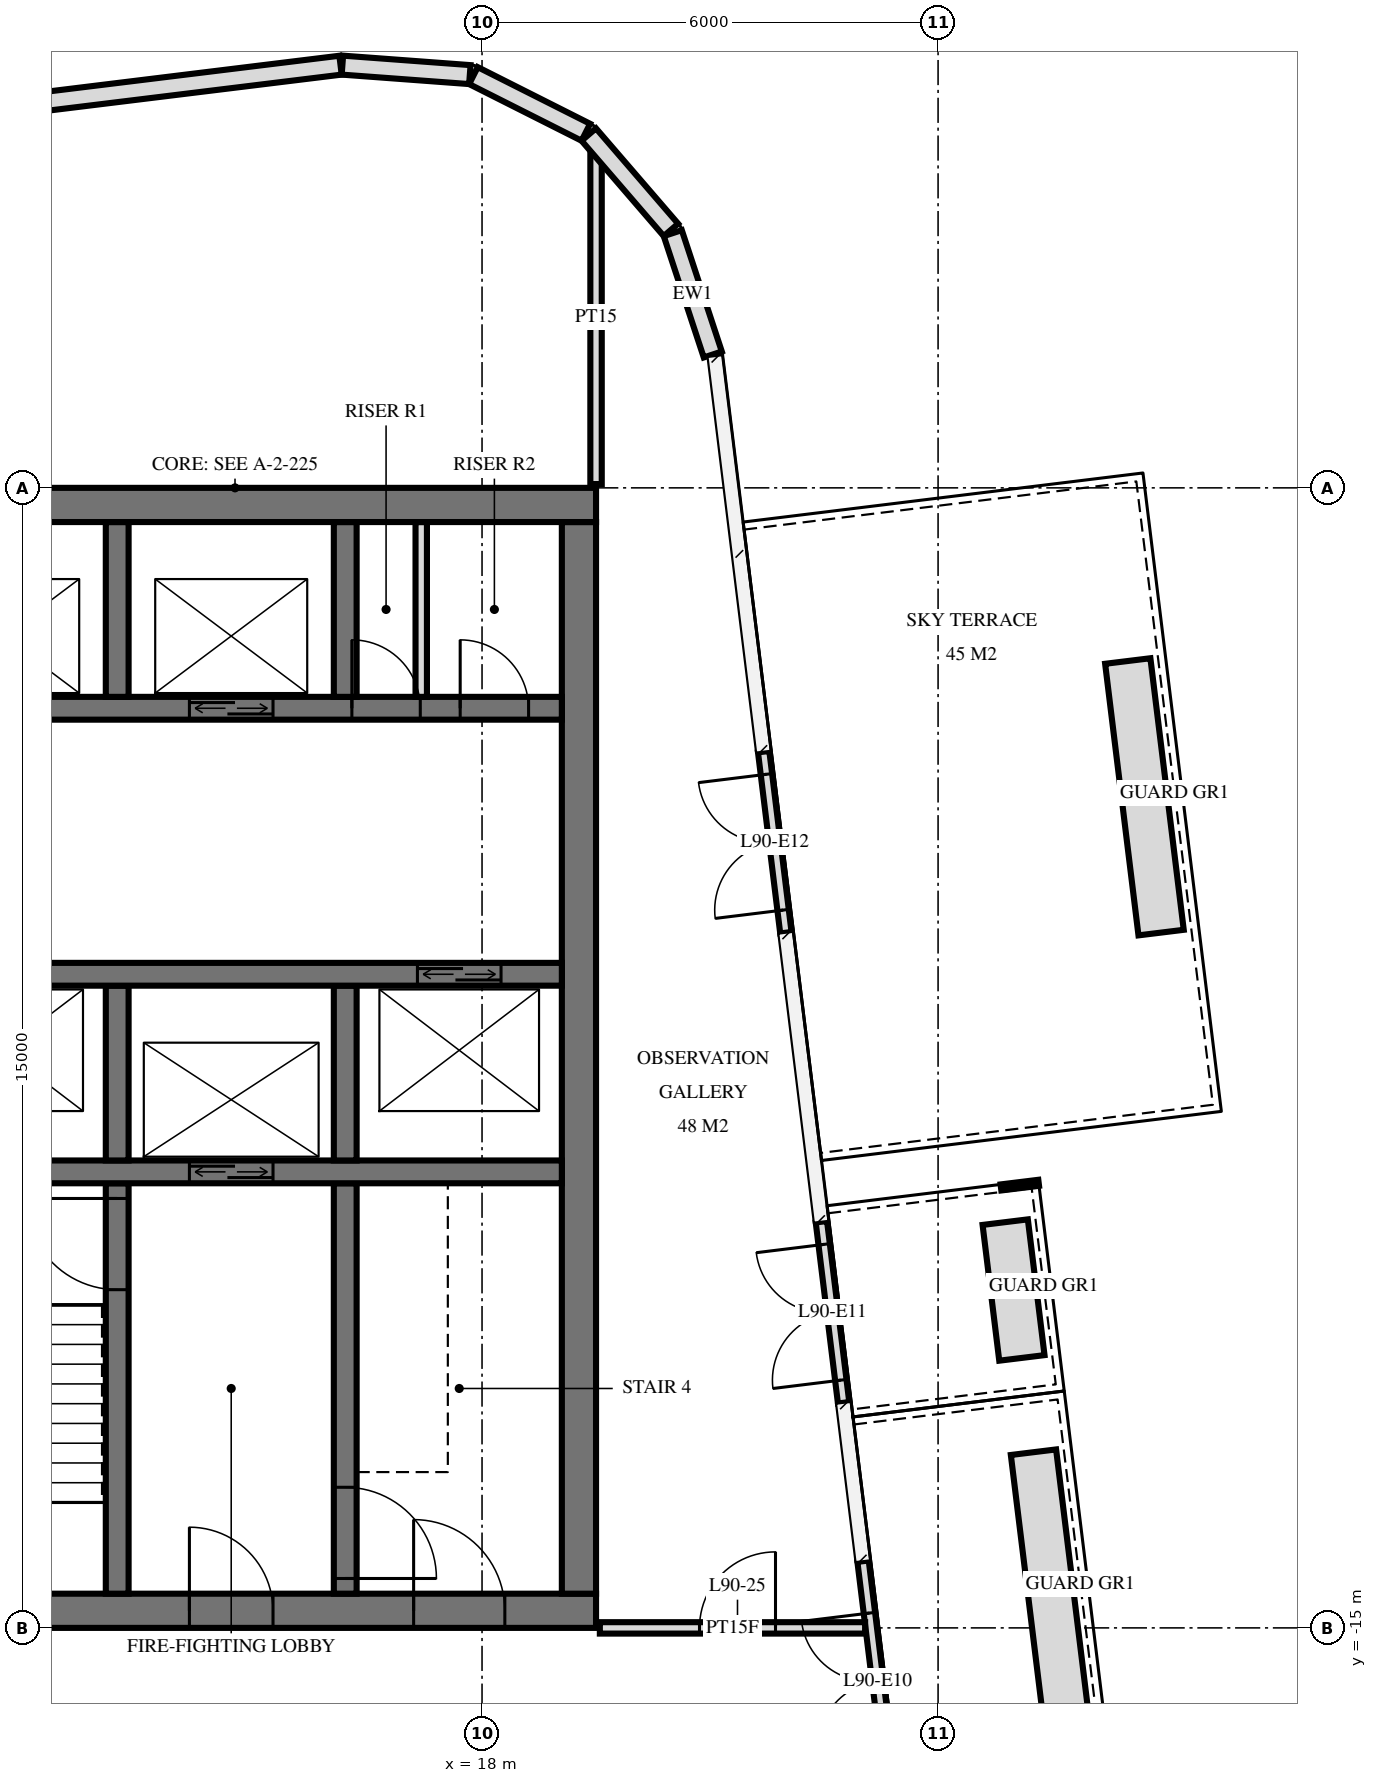
"""IFC4 building model, lengths in metres.
Left out: names, types, materials, properties, quantities, classifications, styles, units other than length and angle.
Written with IfcOpenShell. Run it as: python <this file> out.ifc"""

import sys

from ifc_helpers import new_model, si_unit, direction, frame, frame_2d, origin, place, context, subcontext, project, spatial, rectangle, extrude, element, fill, save


model = new_model("IFC4")
c1 = context("Model", 3, precision=1e-05, world=origin(), true_north=direction((0.0, 1.0)))
c2 = subcontext(c1, "Body", "Model", "MODEL_VIEW")
j1 = project(units=[si_unit("LENGTHUNIT", "METRE"), si_unit("PLANEANGLEUNIT", "RADIAN")], contexts=[c1])
p1 = place(None, origin())
s1 = spatial("IfcSite", under=j1, at=p1, CompositionType="ELEMENT")
p2 = place(p1, origin())
s2 = spatial("IfcBuilding", under=s1, at=p2, CompositionType="ELEMENT")
p3 = place(p2, frame((0.0, 0.0, 342.6)))
s3 = spatial("IfcBuildingStorey", under=s2, at=p3, CompositionType="ELEMENT", Elevation=342.6)
p4 = place(p3, frame((10.0, -0.225, 0.0), z_axis=(0.0, 0.0, 1.0), x_axis=(1.0, 0.0, 0.0)))
e1 = element("IfcWall", 1, at=p4, inside=s3, PredefinedType="SHEAR", context=c2, shape_type="SweptSolid", body=[
    extrude(rectangle(XDim=9.5, YDim=0.45, at=frame_2d((4.75, 0.0))), origin(), (0.0, 0.0, 1.0), 4.0),
])
p5 = place(p3, frame((10.0, -14.775, 0.0), z_axis=(0.0, 0.0, 1.0), x_axis=(1.0, 0.0, 0.0)))
e2 = element("IfcWall", 2, at=p5, inside=s3, PredefinedType="SHEAR", context=c2, shape_type="SweptSolid", body=[
    extrude(rectangle(XDim=9.5, YDim=0.45, at=frame_2d((4.75, 0.0))), origin(), (0.0, 0.0, 1.0), 4.0),
])
p6 = place(p5, frame((7.1, 0.0, 0.0)))
e3 = element("IfcOpeningElement", 3, at=p6, cuts=e2, PredefinedType="OPENING", context=c2, shape_type="SweptSolid", body=[
    extrude(rectangle(XDim=1.2, YDim=2.1, at=frame_2d((0.6, 1.05))), frame((0.0, 0.235, 0.0), z_axis=(0.0, -1.0, 0.0), x_axis=(1.0, 0.0, 0.0)), (0.0, 0.0, 1.0), 0.47),
])
p7 = place(p5, frame((4.15, 0.0, 0.0)))
e4 = element("IfcOpeningElement", 4, at=p7, cuts=e2, PredefinedType="OPENING", context=c2, shape_type="SweptSolid", body=[
    extrude(rectangle(XDim=1.1, YDim=2.1, at=frame_2d((0.55, 1.05))), frame((0.0, 0.235, 0.0), z_axis=(0.0, -1.0, 0.0), x_axis=(1.0, 0.0, 0.0)), (0.0, 0.0, 1.0), 0.47),
])
p8 = place(p3, frame((19.275, -14.55, 0.0), z_axis=(0.0, 0.0, 1.0), x_axis=(0.0, 1.0, 0.0)))
e5 = element("IfcWall", 5, at=p8, inside=s3, PredefinedType="SHEAR", context=c2, shape_type="SweptSolid", body=[
    extrude(rectangle(XDim=14.1, YDim=0.45, at=frame_2d((7.05, 0.0))), origin(), (0.0, 0.0, 1.0), 4.0),
])
p9 = place(p3, frame((10.35, -2.9, 0.0), z_axis=(0.0, 0.0, 1.0), x_axis=(1.0, 0.0, 0.0)))
e6 = element("IfcWall", 6, at=p9, inside=s3, PredefinedType="SHEAR", context=c2, shape_type="SweptSolid", body=[
    extrude(rectangle(XDim=8.7, YDim=0.3, at=frame_2d((4.35, 0.0))), origin(), (0.0, 0.0, 1.0), 4.0),
])
p10 = place(p9, frame((0.8, 0.0, 0.0)))
e7 = element("IfcOpeningElement", 7, at=p10, cuts=e6, PredefinedType="OPENING", context=c2, shape_type="SweptSolid", body=[
    extrude(rectangle(XDim=1.1, YDim=2.1, at=frame_2d((0.55, 1.05))), frame((0.0, 0.16, 0.0), z_axis=(0.0, -1.0, 0.0), x_axis=(1.0, 0.0, 0.0)), (0.0, 0.0, 1.0), 0.32),
])
p11 = place(p9, frame((3.8, 0.0, 0.0)))
e8 = element("IfcOpeningElement", 8, at=p11, cuts=e6, PredefinedType="OPENING", context=c2, shape_type="SweptSolid", body=[
    extrude(rectangle(XDim=1.1, YDim=2.1, at=frame_2d((0.55, 1.05))), frame((0.0, 0.16, 0.0), z_axis=(0.0, -1.0, 0.0), x_axis=(1.0, 0.0, 0.0)), (0.0, 0.0, 1.0), 0.32),
])
p12 = place(p9, frame((5.938, 0.0, 0.0)))
e9 = element("IfcOpeningElement", 9, at=p12, cuts=e6, PredefinedType="OPENING", context=c2, shape_type="SweptSolid", body=[
    extrude(rectangle(XDim=0.9, YDim=2.1, at=frame_2d((0.45, 1.05))), frame((0.0, 0.16, 0.0), z_axis=(0.0, -1.0, 0.0), x_axis=(1.0, 0.0, 0.0)), (0.0, 0.0, 1.0), 0.32),
])
p13 = place(p9, frame((7.363, 0.0, 0.0)))
e10 = element("IfcOpeningElement", 10, at=p13, cuts=e6, PredefinedType="OPENING", context=c2, shape_type="SweptSolid", body=[
    extrude(rectangle(XDim=0.9, YDim=2.1, at=frame_2d((0.45, 1.05))), frame((0.0, 0.16, 0.0), z_axis=(0.0, -1.0, 0.0), x_axis=(1.0, 0.0, 0.0)), (0.0, 0.0, 1.0), 0.32),
])
p14 = place(p3, frame((10.35, -6.4, 0.0), z_axis=(0.0, 0.0, 1.0), x_axis=(1.0, 0.0, 0.0)))
e11 = element("IfcWall", 11, at=p14, inside=s3, PredefinedType="SHEAR", context=c2, shape_type="SweptSolid", body=[
    extrude(rectangle(XDim=8.7, YDim=0.3, at=frame_2d((4.35, 0.0))), origin(), (0.0, 0.0, 1.0), 4.0),
])
p15 = place(p14, frame((0.8, 0.0, 0.0)))
e12 = element("IfcOpeningElement", 12, at=p15, cuts=e11, PredefinedType="OPENING", context=c2, shape_type="SweptSolid", body=[
    extrude(rectangle(XDim=1.1, YDim=2.1, at=frame_2d((0.55, 1.05))), frame((0.0, 0.16, 0.0), z_axis=(0.0, -1.0, 0.0), x_axis=(1.0, 0.0, 0.0)), (0.0, 0.0, 1.0), 0.32),
])
p16 = place(p14, frame((6.8, 0.0, 0.0)))
e13 = element("IfcOpeningElement", 13, at=p16, cuts=e11, PredefinedType="OPENING", context=c2, shape_type="SweptSolid", body=[
    extrude(rectangle(XDim=1.1, YDim=2.1, at=frame_2d((0.55, 1.05))), frame((0.0, 0.16, 0.0), z_axis=(0.0, -1.0, 0.0), x_axis=(1.0, 0.0, 0.0)), (0.0, 0.0, 1.0), 0.32),
])
p17 = place(p3, frame((10.35, -9.0, 0.0), z_axis=(0.0, 0.0, 1.0), x_axis=(1.0, 0.0, 0.0)))
e14 = element("IfcWall", 14, at=p17, inside=s3, PredefinedType="SHEAR", context=c2, shape_type="SweptSolid", body=[
    extrude(rectangle(XDim=8.7, YDim=0.3, at=frame_2d((4.35, 0.0))), origin(), (0.0, 0.0, 1.0), 4.0),
])
p18 = place(p17, frame((3.8, 0.0, 0.0)))
e15 = element("IfcOpeningElement", 15, at=p18, cuts=e14, PredefinedType="OPENING", context=c2, shape_type="SweptSolid", body=[
    extrude(rectangle(XDim=1.1, YDim=2.1, at=frame_2d((0.55, 1.05))), frame((0.0, 0.16, 0.0), z_axis=(0.0, -1.0, 0.0), x_axis=(1.0, 0.0, 0.0)), (0.0, 0.0, 1.0), 0.32),
])
for number, where, z_axis, x_axis in (
    (16, (13.2, -2.75, 0.0), (0.0, 0.0, 1.0), (0.0, 1.0, 0.0)),
    (17, (13.2, -8.85, 0.0), (0.0, 0.0, 1.0), (0.0, 1.0, 0.0)),
):
    element("IfcWall", number, at=place(p3, frame(where, z_axis=z_axis, x_axis=x_axis)), inside=s3, PredefinedType="SHEAR", context=c2, shape_type="SweptSolid", body=[
        extrude(rectangle(XDim=2.3, YDim=0.3, at=frame_2d((1.15, 0.0))), origin(), (0.0, 0.0, 1.0), 4.0),
    ])
p19 = place(p3, frame((13.2, -14.55, 0.0), z_axis=(0.0, 0.0, 1.0), x_axis=(0.0, 1.0, 0.0)))
e18 = element("IfcWall", 18, at=p19, inside=s3, PredefinedType="SHEAR", context=c2, shape_type="SweptSolid", body=[
    extrude(rectangle(XDim=5.4, YDim=0.3, at=frame_2d((2.7, 0.0))), origin(), (0.0, 0.0, 1.0), 4.0),
])
p20 = place(p19, frame((4.0, 0.0, 0.0)))
e19 = element("IfcOpeningElement", 19, at=p20, cuts=e18, PredefinedType="OPENING", context=c2, shape_type="SweptSolid", body=[
    extrude(rectangle(XDim=1.2, YDim=2.1, at=frame_2d((0.6, 1.05))), frame((0.0, 0.16, 0.0), z_axis=(0.0, -1.0, 0.0), x_axis=(1.0, 0.0, 0.0)), (0.0, 0.0, 1.0), 0.32),
])
for number, where, z_axis, x_axis in (
    (20, (16.2, -2.75, 0.0), (0.0, 0.0, 1.0), (0.0, 1.0, 0.0)),
    (21, (16.2, -8.85, 0.0), (0.0, 0.0, 1.0), (0.0, 1.0, 0.0)),
):
    element("IfcWall", number, at=place(p3, frame(where, z_axis=z_axis, x_axis=x_axis)), inside=s3, PredefinedType="SHEAR", context=c2, shape_type="SweptSolid", body=[
        extrude(rectangle(XDim=2.3, YDim=0.3, at=frame_2d((1.15, 0.0))), origin(), (0.0, 0.0, 1.0), 4.0),
    ])
p21 = place(p3, frame((16.2, -14.55, 0.0), z_axis=(0.0, 0.0, 1.0), x_axis=(0.0, 1.0, 0.0)))
e22 = element("IfcWall", 22, at=p21, inside=s3, PredefinedType="SHEAR", context=c2, shape_type="SweptSolid", body=[
    extrude(rectangle(XDim=5.4, YDim=0.3, at=frame_2d((2.7, 0.0))), origin(), (0.0, 0.0, 1.0), 4.0),
])
p22 = place(p21, frame((0.2, 0.0, 0.0)))
e23 = element("IfcOpeningElement", 23, at=p22, cuts=e22, PredefinedType="OPENING", context=c2, shape_type="SweptSolid", body=[
    extrude(rectangle(XDim=1.2, YDim=2.1, at=frame_2d((0.6, 1.05))), frame((0.0, 0.16, 0.0), z_axis=(0.0, -1.0, 0.0), x_axis=(1.0, 0.0, 0.0)), (0.0, 0.0, 1.0), 0.32),
])
p23 = place(p3, frame((21.036, 1.755, 0.0), z_axis=(0.0, 0.0, 1.0), x_axis=(-0.313046160822, 0.949737911844, 0.0)))
e24 = element("IfcWall", 24, at=p23, inside=s3, PredefinedType="SOLIDWALL", context=c2, shape_type="SweptSolid", body=[
    extrude(rectangle(XDim=1.681, YDim=0.25, at=frame_2d((0.841, 0.0))), origin(), (0.0, 0.0, 1.0), 3.72),
])
for number, where, z_axis, x_axis in (
    (25, (20.485, 3.394, 0.0), (0.0, 0.0, 1.0), (-0.653, 0.758, 0.0)),
    (26, (19.366, 4.679, 0.0), (0.0, 0.0, 1.0), (-0.893, 0.45, 0.0)),
):
    element("IfcWall", number, at=place(p3, frame(where, z_axis=z_axis, x_axis=x_axis)), inside=s3, PredefinedType="SOLIDWALL", context=c2, shape_type="SweptSolid", body=[
        extrude(rectangle(XDim=1.656, YDim=0.25, at=frame_2d((0.828, 0.0))), origin(), (0.0, 0.0, 1.0), 3.72),
    ])
p24 = place(p3, frame((17.84, 5.438, 0.0), z_axis=(0.0, 0.0, 1.0), x_axis=(-0.997254267475, 0.074053534713, 0.0)))
e27 = element("IfcWall", 27, at=p24, inside=s3, PredefinedType="SOLIDWALL", context=c2, shape_type="SweptSolid", body=[
    extrude(rectangle(XDim=1.681, YDim=0.25, at=frame_2d((0.841, 0.0))), origin(), (0.0, 0.0, 1.0), 3.72),
])
p25 = place(p3, frame((16.138, 5.561, 0.0), z_axis=(0.0, 0.0, 1.0), x_axis=(-0.992546726876, -0.121864658405, 0.0)))
e28 = element("IfcWall", 28, at=p25, inside=s3, PredefinedType="SOLIDWALL", context=c2, shape_type="SweptSolid", body=[
    extrude(rectangle(XDim=35.951, YDim=0.25, at=frame_2d((17.975, 0.0))), origin(), (0.0, 0.0, 1.0), 3.72),
])
p26 = place(p3, frame((23.4, -17.274, 0.0), z_axis=(0.0, 0.0, 1.0), x_axis=(-0.121858082248, 0.992547534273, 0.0)))
e29 = element("IfcWall", 29, at=p26, inside=s3, PredefinedType="USERDEFINED", context=c2, shape_type="SweptSolid", body=[
    extrude(rectangle(XDim=3.176, YDim=0.15, at=frame_2d((1.588, 0.0))), origin(), (0.0, 0.0, 1.0), 3.72),
])
p27 = place(p26, frame((0.688, 0.0, 0.0)))
e30 = element("IfcOpeningElement", 30, at=p27, cuts=e29, PredefinedType="OPENING", context=c2, shape_type="SweptSolid", body=[
    extrude(rectangle(XDim=1.8, YDim=2.4, at=frame_2d((0.9, 1.2))), frame((0.0, 0.085, 0.0), z_axis=(0.0, -1.0, 0.0), x_axis=(1.0, 0.0, 0.0)), (0.0, 0.0, 1.0), 0.17),
])
p28 = place(p3, frame((22.757, -12.038, 0.0), z_axis=(0.0, 0.0, 1.0), x_axis=(-0.121868445399, 0.992546261902, 0.0)))
e31 = element("IfcWall", 31, at=p28, inside=s3, PredefinedType="USERDEFINED", context=c2, shape_type="SweptSolid", body=[
    extrude(rectangle(XDim=2.4, YDim=0.15, at=frame_2d((1.2, 0.0))), origin(), (0.0, 0.0, 1.0), 3.72),
])
p29 = place(p28, frame((0.3, 0.0, 0.0)))
e32 = element("IfcOpeningElement", 32, at=p29, cuts=e31, PredefinedType="OPENING", context=c2, shape_type="SweptSolid", body=[
    extrude(rectangle(XDim=1.8, YDim=2.4, at=frame_2d((0.9, 1.2))), frame((0.0, 0.085, 0.0), z_axis=(0.0, -1.0, 0.0), x_axis=(1.0, 0.0, 0.0)), (0.0, 0.0, 1.0), 0.17),
])
p30 = place(p3, frame((21.998, -5.853, 0.0), z_axis=(0.0, 0.0, 1.0), x_axis=(-0.121868445399, 0.992546261902, 0.0)))
e33 = element("IfcWall", 33, at=p30, inside=s3, PredefinedType="USERDEFINED", context=c2, shape_type="SweptSolid", body=[
    extrude(rectangle(XDim=2.4, YDim=0.15, at=frame_2d((1.2, 0.0))), origin(), (0.0, 0.0, 1.0), 3.72),
])
p31 = place(p30, frame((0.3, 0.0, 0.0)))
e34 = element("IfcOpeningElement", 34, at=p31, cuts=e33, PredefinedType="OPENING", context=c2, shape_type="SweptSolid", body=[
    extrude(rectangle(XDim=1.8, YDim=2.4, at=frame_2d((0.9, 1.2))), frame((0.0, 0.085, 0.0), z_axis=(0.0, -1.0, 0.0), x_axis=(1.0, 0.0, 0.0)), (0.0, 0.0, 1.0), 0.17),
])
p32 = place(p3, frame((25.255, -12.688, 0.0), z_axis=(0.0, 0.0, 1.0), x_axis=(0.121864343918, -0.992546765488, 0.0)))
e35 = element("IfcWall", 35, at=p32, inside=s3, PredefinedType="USERDEFINED", context=c2, shape_type="SweptSolid", body=[
    extrude(rectangle(XDim=3.6, YDim=0.6, at=frame_2d((1.8, 0.0))), origin(), (0.0, 0.0, 1.0), 0.65),
])
p33 = place(p3, frame((24.883, -9.662, 0.0), z_axis=(0.0, 0.0, 1.0), x_axis=(0.121830336845, -0.992550940267, 0.0)))
e36 = element("IfcWall", 36, at=p33, inside=s3, PredefinedType="USERDEFINED", context=c2, shape_type="SweptSolid", body=[
    extrude(rectangle(XDim=1.8, YDim=0.6, at=frame_2d((0.9, 0.0))), origin(), (0.0, 0.0, 1.0), 0.65),
])
p34 = place(p3, frame((26.496, -2.278, 0.0), z_axis=(0.0, 0.0, 1.0), x_axis=(0.121864343918, -0.992546765488, 0.0)))
e37 = element("IfcWall", 37, at=p34, inside=s3, PredefinedType="USERDEFINED", context=c2, shape_type="SweptSolid", body=[
    extrude(rectangle(XDim=3.6, YDim=0.6, at=frame_2d((1.8, 0.0))), origin(), (0.0, 0.0, 1.0), 0.65),
])
p35 = place(p3, frame((17.2, -2.75, 0.0), z_axis=(0.0, 0.0, 1.0), x_axis=(0.0, 1.0, 0.0)))
e38 = element("IfcWall", 38, at=p35, inside=s3, PredefinedType="PARTITIONING", context=c2, shape_type="SweptSolid", body=[
    extrude(rectangle(XDim=2.3, YDim=0.15, at=frame_2d((1.15, 0.0))), origin(), (0.0, 0.0, 1.0), 3.7),
])
p36 = place(p3, frame((19.5, 0.05, 0.0), z_axis=(0.0, 0.0, 1.0), x_axis=(0.0, 1.0, 0.0)))
e39 = element("IfcWall", 39, at=p36, inside=s3, PredefinedType="PARTITIONING", context=c2, shape_type="SweptSolid", body=[
    extrude(rectangle(XDim=4.403, YDim=0.15, at=frame_2d((2.202, 0.0))), origin(), (0.0, 0.0, 1.0), 3.72),
])
p37 = place(p3, frame((19.55, -15.0, 0.0), z_axis=(0.0, 0.0, 1.0), x_axis=(1.0, 0.0, 0.0)))
e40 = element("IfcWall", 40, at=p37, inside=s3, PredefinedType="PARTITIONING", context=c2, shape_type="SweptSolid", body=[
    extrude(rectangle(XDim=3.49, YDim=0.15, at=frame_2d((1.745, 0.0))), origin(), (0.0, 0.0, 1.0), 3.72),
])
p38 = place(p37, frame((1.311, 0.0, 0.0)))
e41 = element("IfcOpeningElement", 41, at=p38, cuts=e40, PredefinedType="OPENING", context=c2, shape_type="SweptSolid", body=[
    extrude(rectangle(XDim=1.0, YDim=2.1, at=frame_2d((0.5, 1.05))), frame((0.0, 0.085, 0.0), z_axis=(0.0, -1.0, 0.0), x_axis=(1.0, 0.0, 0.0)), (0.0, 0.0, 1.0), 0.17),
])
p39 = place(p27, origin())
e42 = element("IfcDoor", 42, at=p39, inside=s3, OperationType="DOUBLE_DOOR_SINGLE_SWING", PredefinedType="DOOR", context=c2, shape_type="SweptSolid", body=[
    extrude(rectangle(XDim=1.8, YDim=2.4, at=frame_2d((0.9, 1.2))), frame((0.0, 0.025, 0.0), z_axis=(0.0, -1.0, 0.0), x_axis=(1.0, 0.0, 0.0)), (0.0, 0.0, 1.0), 0.05),
])
fill(e30, e42)
p40 = place(p29, origin())
e43 = element("IfcDoor", 43, at=p40, inside=s3, OperationType="DOUBLE_DOOR_SINGLE_SWING", PredefinedType="DOOR", context=c2, shape_type="SweptSolid", body=[
    extrude(rectangle(XDim=1.8, YDim=2.4, at=frame_2d((0.9, 1.2))), frame((0.0, 0.025, 0.0), z_axis=(0.0, -1.0, 0.0), x_axis=(1.0, 0.0, 0.0)), (0.0, 0.0, 1.0), 0.05),
])
fill(e32, e43)
p41 = place(p31, origin())
e44 = element("IfcDoor", 44, at=p41, inside=s3, OperationType="DOUBLE_DOOR_SINGLE_SWING", PredefinedType="DOOR", context=c2, shape_type="SweptSolid", body=[
    extrude(rectangle(XDim=1.8, YDim=2.4, at=frame_2d((0.9, 1.2))), frame((0.0, 0.025, 0.0), z_axis=(0.0, -1.0, 0.0), x_axis=(1.0, 0.0, 0.0)), (0.0, 0.0, 1.0), 0.05),
])
fill(e34, e44)
p42 = place(p11, origin())
e45 = element("IfcDoor", 45, at=p42, inside=s3, OperationType="DOUBLE_DOOR_SLIDING", PredefinedType="USERDEFINED", context=c2, shape_type="SweptSolid", body=[
    extrude(rectangle(XDim=1.1, YDim=2.1, at=frame_2d((0.55, 1.05))), frame((0.0, 0.025, 0.0), z_axis=(0.0, -1.0, 0.0), x_axis=(1.0, 0.0, 0.0)), (0.0, 0.0, 1.0), 0.05),
])
fill(e8, e45)
p43 = place(p18, origin())
e46 = element("IfcDoor", 46, at=p43, inside=s3, OperationType="DOUBLE_DOOR_SLIDING", PredefinedType="USERDEFINED", context=c2, shape_type="SweptSolid", body=[
    extrude(rectangle(XDim=1.1, YDim=2.1, at=frame_2d((0.55, 1.05))), frame((0.0, 0.025, 0.0), z_axis=(0.0, -1.0, 0.0), x_axis=(1.0, 0.0, 0.0)), (0.0, 0.0, 1.0), 0.05),
])
fill(e15, e46)
p44 = place(p16, origin())
e47 = element("IfcDoor", 47, at=p44, inside=s3, OperationType="DOUBLE_DOOR_SLIDING", PredefinedType="USERDEFINED", context=c2, shape_type="SweptSolid", body=[
    extrude(rectangle(XDim=1.1, YDim=2.1, at=frame_2d((0.55, 1.05))), frame((0.0, 0.025, 0.0), z_axis=(0.0, -1.0, 0.0), x_axis=(1.0, 0.0, 0.0)), (0.0, 0.0, 1.0), 0.05),
])
fill(e13, e47)
p45 = place(p6, origin())
e48 = element("IfcDoor", 48, at=p45, inside=s3, OperationType="SINGLE_SWING_RIGHT", PredefinedType="DOOR", context=c2, shape_type="SweptSolid", body=[
    extrude(rectangle(XDim=1.2, YDim=2.1, at=frame_2d((0.6, 1.05))), frame((0.0, 0.025, 0.0), z_axis=(0.0, -1.0, 0.0), x_axis=(1.0, 0.0, 0.0)), (0.0, 0.0, 1.0), 0.05),
])
fill(e3, e48)
p46 = place(p7, origin())
e49 = element("IfcDoor", 49, at=p46, inside=s3, OperationType="SINGLE_SWING_RIGHT", PredefinedType="DOOR", context=c2, shape_type="SweptSolid", body=[
    extrude(rectangle(XDim=1.1, YDim=2.1, at=frame_2d((0.55, 1.05))), frame((0.0, 0.025, 0.0), z_axis=(0.0, -1.0, 0.0), x_axis=(1.0, 0.0, 0.0)), (0.0, 0.0, 1.0), 0.05),
])
fill(e4, e49)
p47 = place(p12, origin())
e50 = element("IfcDoor", 50, at=p47, inside=s3, OperationType="SINGLE_SWING_RIGHT", PredefinedType="DOOR", context=c2, shape_type="SweptSolid", body=[
    extrude(rectangle(XDim=0.9, YDim=2.1, at=frame_2d((0.45, 1.05))), frame((0.0, 0.025, 0.0), z_axis=(0.0, -1.0, 0.0), x_axis=(1.0, 0.0, 0.0)), (0.0, 0.0, 1.0), 0.05),
])
fill(e9, e50)
p48 = place(p13, origin())
e51 = element("IfcDoor", 51, at=p48, inside=s3, OperationType="SINGLE_SWING_RIGHT", PredefinedType="DOOR", context=c2, shape_type="SweptSolid", body=[
    extrude(rectangle(XDim=0.9, YDim=2.1, at=frame_2d((0.45, 1.05))), frame((0.0, 0.025, 0.0), z_axis=(0.0, -1.0, 0.0), x_axis=(1.0, 0.0, 0.0)), (0.0, 0.0, 1.0), 0.05),
])
fill(e10, e51)
p49 = place(p20, origin())
e52 = element("IfcDoor", 52, at=p49, inside=s3, OperationType="SINGLE_SWING_LEFT", PredefinedType="DOOR", context=c2, shape_type="SweptSolid", body=[
    extrude(rectangle(XDim=1.2, YDim=2.1, at=frame_2d((0.6, 1.05))), frame((0.0, 0.025, 0.0), z_axis=(0.0, -1.0, 0.0), x_axis=(1.0, 0.0, 0.0)), (0.0, 0.0, 1.0), 0.05),
])
fill(e19, e52)
p50 = place(p22, frame((0.6, 0.0, 0.0), z_axis=(0.0, 0.0, 1.0), x_axis=(-1.0, 0.0, 0.0)))
e53 = element("IfcDoor", 53, at=p50, inside=s3, OperationType="SINGLE_SWING_LEFT", PredefinedType="DOOR", context=c2, shape_type="SweptSolid", body=[
    extrude(rectangle(XDim=1.2, YDim=2.1, at=frame_2d((0.0, 1.05))), frame((0.0, -0.025, 0.0), z_axis=(0.0, 1.0, 0.0), x_axis=(-1.0, 0.0, 0.0)), (0.0, 0.0, 1.0), 0.05),
])
fill(e23, e53)
p51 = place(p38, origin())
e54 = element("IfcDoor", 54, at=p51, inside=s3, OperationType="SINGLE_SWING_LEFT", PredefinedType="DOOR", context=c2, shape_type="SweptSolid", body=[
    extrude(rectangle(XDim=1.0, YDim=2.1, at=frame_2d((0.5, 1.05))), frame((0.0, 0.025, 0.0), z_axis=(0.0, -1.0, 0.0), x_axis=(1.0, 0.0, 0.0)), (0.0, 0.0, 1.0), 0.05),
])
fill(e41, e54)
save(model, sys.argv[1])
